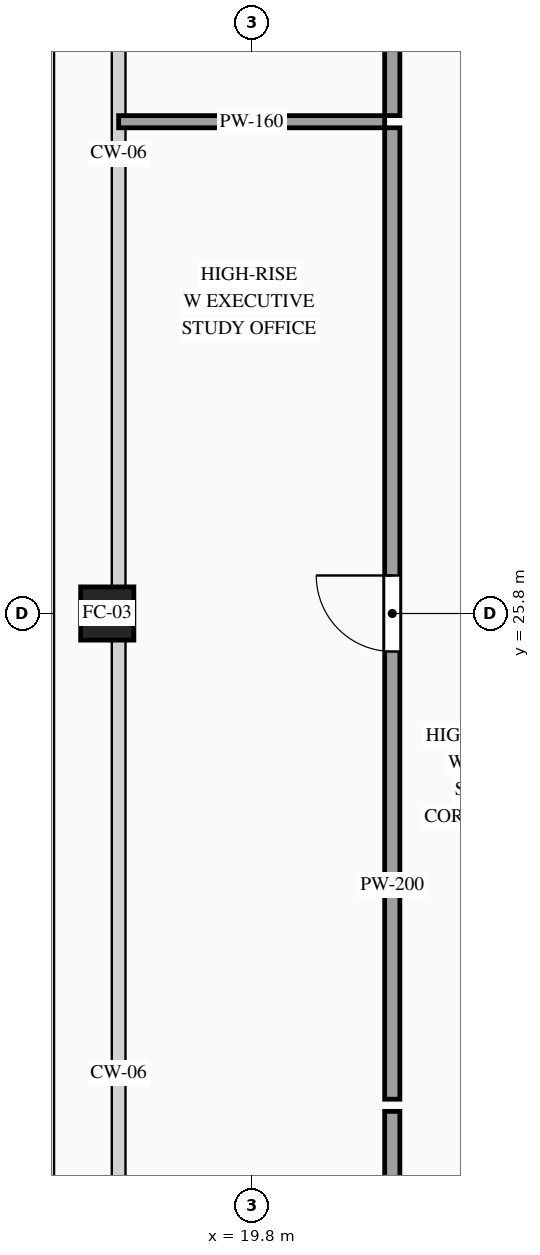
"""IFC4 building model, lengths in metres.
Left out: names, types, materials, properties, quantities, classifications, styles, units other than length and angle.
Written with IfcOpenShell. Run it as: python <this file> out.ifc"""

import sys

from ifc_helpers import new_model, si_unit, direction, frame, frame_2d, origin, origin_2d, place, context, subcontext, project, spatial, rectangle, hollow_rectangle, extrude, source, transform, mapped, element, fill, save


model = new_model("IFC4")
c1 = context("Model", 3, precision=1e-05, world=origin(), true_north=direction((0.0, 1.0)))
c2 = subcontext(c1, "Body", "Model", "MODEL_VIEW")
j1 = project(units=[si_unit("LENGTHUNIT", "METRE"), si_unit("PLANEANGLEUNIT", "RADIAN")], contexts=[c1])
p1 = place(None, origin())
s1 = spatial("IfcSite", under=j1, at=p1, CompositionType="ELEMENT")
p2 = place(p1, origin())
s2 = spatial("IfcBuilding", under=s1, at=p2, CompositionType="ELEMENT")
p3 = place(p2, frame((0.0, 0.0, 339.2)))
s3 = spatial("IfcBuildingStorey", under=s2, at=p3, CompositionType="ELEMENT", Elevation=339.2)
m1 = source(origin(), c2, "Body", "SweptSolid", [
    extrude(hollow_rectangle(XDim=0.7, YDim=0.7, WallThickness=0.032, at=origin_2d()), origin(), (0.0, 0.0, 1.0), 4.0),
])
p4 = place(p3, frame((17.9, 25.8, 0.0), z_axis=(0.0, 0.0, 1.0), x_axis=(1.0, 0.0, 0.0)))
e1 = element("IfcColumn", 1, at=p4, inside=s3, PredefinedType="COLUMN", context=c2, shape_type="MappedRepresentation", body=[
    mapped(m1, transform((0.0, 0.0, 0.0), scale=1.0)),
])
m2 = source(origin(), c2, "Body", "SweptSolid", [
    extrude(rectangle(XDim=1.7, YDim=0.2, at=frame_2d((0.85, 0.0))), origin(), (0.0, 0.0, 1.0), 3.76),
])
for number, where, z_axis, x_axis in (
    (2, (21.65, 32.35, 0.0), (0.0, 0.0, 1.0), (0.0, 1.0, 0.0)),
    (3, (21.65, 17.55, 0.0), (0.0, 0.0, 1.0), (0.0, 1.0, 0.0)),
):
    element("IfcWall", number, at=place(p3, frame(where, z_axis=z_axis, x_axis=x_axis)), inside=s3, PredefinedType="PARTITIONING", context=c2, shape_type="MappedRepresentation", body=[
        mapped(m2, transform((0.0, 0.0, 0.0), scale=1.0)),
    ])
p5 = place(p3, frame((21.65, 19.41, 0.0), z_axis=(0.0, 0.0, 1.0), x_axis=(0.0, 1.0, 0.0)))
e4 = element("IfcWall", 4, at=p5, inside=s3, PredefinedType="PARTITIONING", context=c2, shape_type="SweptSolid", body=[
    extrude(rectangle(XDim=12.78, YDim=0.2, at=frame_2d((6.39, 0.0))), origin(), (0.0, 0.0, 1.0), 3.76),
])
p6 = place(p5, frame((5.89, 0.0, 0.0)))
e5 = element("IfcOpeningElement", 5, at=p6, cuts=e4, PredefinedType="OPENING", context=c2, shape_type="SweptSolid", body=[
    extrude(rectangle(XDim=1.0, YDim=2.2, at=frame_2d((0.5, 1.1))), frame((0.0, 0.115, 0.0), z_axis=(0.0, -1.0, 0.0), x_axis=(1.0, 0.0, 0.0)), (0.0, 0.0, 1.0), 0.23),
])
m3 = source(origin(), c2, "Body", "SweptSolid", [
    extrude(rectangle(XDim=3.5, YDim=0.16, at=frame_2d((1.75, 0.0))), origin(), (0.0, 0.0, 1.0), 3.305),
])
p7 = place(p3, frame((18.05, 32.27, 0.0), z_axis=(0.0, 0.0, 1.0), x_axis=(1.0, 0.0, 0.0)))
e6 = element("IfcWall", 6, at=p7, inside=s3, PredefinedType="PARTITIONING", context=c2, shape_type="MappedRepresentation", body=[
    mapped(m3, transform((0.0, 0.0, 0.0), scale=1.0)),
])
m4 = source(origin(), c2, "Body", "SweptSolid", [
    extrude(rectangle(XDim=1.0, YDim=2.2, at=frame_2d((0.5, 1.1))), frame((0.0, 0.025, 0.0), z_axis=(0.0, -1.0, 0.0), x_axis=(1.0, 0.0, 0.0)), (0.0, 0.0, 1.0), 0.05),
])
p8 = place(p6, origin())
e7 = element("IfcDoor", 7, at=p8, inside=s3, OperationType="SINGLE_SWING_RIGHT", PredefinedType="DOOR", context=c2, shape_type="MappedRepresentation", body=[
    mapped(m4, transform((0.0, 0.0, 0.0), scale=1.0)),
])
fill(e5, e7)
save(model, sys.argv[1])
